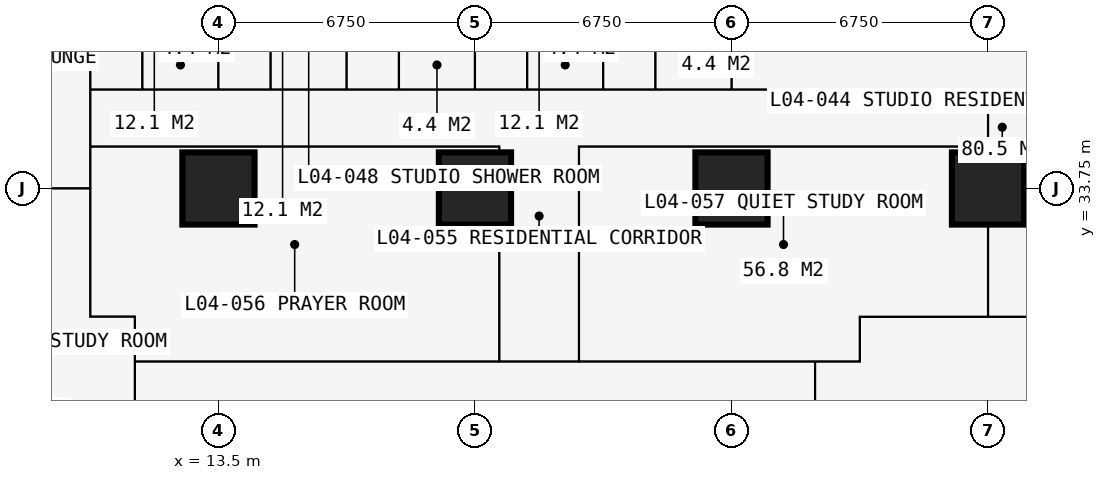
"""IFC4 building model, lengths in metres.
Left out: names, types, materials, properties, quantities, classifications, styles, units other than length and angle.
Written with IfcOpenShell. Run it as: python <this file> out.ifc"""

import sys

from ifc_helpers import new_model, si_unit, direction, frame, frame_2d, origin, origin_2d, place, context, subcontext, project, spatial, rectangle, extrude, element, fill, save


model = new_model("IFC4")
c1 = context("Model", 3, precision=1e-05, world=origin(), true_north=direction((0.0, 1.0)))
c2 = subcontext(c1, "Body", "Model", "MODEL_VIEW")
j1 = project(units=[si_unit("LENGTHUNIT", "METRE"), si_unit("PLANEANGLEUNIT", "RADIAN")], contexts=[c1])
p1 = place(None, origin())
s1 = spatial("IfcSite", under=j1, at=p1, CompositionType="ELEMENT")
p2 = place(p1, origin())
s2 = spatial("IfcBuilding", under=s1, at=p2, CompositionType="ELEMENT")
p3 = place(p2, frame((0.0, 0.0, 18.0)))
s3 = spatial("IfcBuildingStorey", under=s2, at=p3, CompositionType="ELEMENT", Elevation=18.0)
for number, where, z_axis, x_axis in (
    (1, (13.5, 33.75, 0.0), (0.0, 0.0, 1.0), (1.0, 0.0, 0.0)),
    (2, (20.25, 33.75, 0.0), (0.0, 0.0, 1.0), (1.0, 0.0, 0.0)),
    (3, (27.0, 33.75, 0.0), (0.0, 0.0, 1.0), (1.0, 0.0, 0.0)),
    (4, (33.75, 33.75, 0.0), (0.0, 0.0, 1.0), (1.0, 0.0, 0.0)),
):
    element("IfcColumn", number, at=place(p3, frame(where, z_axis=z_axis, x_axis=x_axis)), inside=s3, PredefinedType="COLUMN", context=c2, shape_type="SweptSolid", body=[
        extrude(rectangle(XDim=1.9, YDim=1.9, at=origin_2d()), origin(), (0.0, 0.0, 1.0), 3.6),
    ])
p4 = place(p3, frame((4.15, 33.75, 0.0), z_axis=(0.0, 0.0, 1.0), x_axis=(1.0, 0.0, 0.0)))
e5 = element("IfcWall", 5, at=p4, inside=s3, PredefinedType="PARTITIONING", context=c2, shape_type="SweptSolid", body=[
    extrude(rectangle(XDim=5.975, YDim=0.15, at=frame_2d((2.988, 0.0))), origin(), (0.0, 0.0, 1.0), 2.877),
])
p5 = place(p3, frame((10.125, 30.375, 0.0), z_axis=(0.0, 0.0, 1.0), x_axis=(0.0, 1.0, 0.0)))
e6 = element("IfcWall", 6, at=p5, inside=s3, PredefinedType="PARTITIONING", context=c2, shape_type="SweptSolid", body=[
    extrude(rectangle(XDim=10.859, YDim=0.15, at=frame_2d((5.429, 0.0))), origin(), (0.0, 0.0, 1.0), 3.375),
])
p6 = place(p5, frame((4.725, 0.0, 0.0)))
e7 = element("IfcOpeningElement", 7, at=p6, cuts=e6, PredefinedType="OPENING", context=c2, shape_type="SweptSolid", body=[
    extrude(rectangle(XDim=1.0, YDim=2.2, at=frame_2d((0.5, 1.1))), frame((0.0, 0.085, 0.0), z_axis=(0.0, -1.0, 0.0), x_axis=(1.0, 0.0, 0.0)), (0.0, 0.0, 1.0), 0.17),
])
p7 = place(p3, frame((10.125, 30.375, 0.0), z_axis=(0.0, 0.0, 1.0), x_axis=(1.0, 0.0, 0.0)))
e8 = element("IfcWall", 8, at=p7, inside=s3, PredefinedType="PARTITIONING", context=c2, shape_type="SweptSolid", body=[
    extrude(rectangle(XDim=1.175, YDim=0.15, at=frame_2d((0.587, 0.0))), origin(), (0.0, 0.0, 1.0), 3.375),
])
p8 = place(p3, frame((10.125, 34.85, 0.0), z_axis=(0.0, 0.0, 1.0), x_axis=(1.0, 0.0, 0.0)))
e9 = element("IfcWall", 9, at=p8, inside=s3, PredefinedType="PARTITIONING", context=c2, shape_type="SweptSolid", body=[
    extrude(rectangle(XDim=10.762, YDim=0.15, at=frame_2d((5.381, 0.0))), origin(), (0.0, 0.0, 1.0), 3.375),
])
p9 = place(p8, frame((4.9, 0.0, 0.0)))
e10 = element("IfcOpeningElement", 10, at=p9, cuts=e9, PredefinedType="OPENING", context=c2, shape_type="SweptSolid", body=[
    extrude(rectangle(XDim=0.95, YDim=2.2, at=frame_2d((0.475, 1.1))), frame((0.0, 0.085, 0.0), z_axis=(0.0, -1.0, 0.0), x_axis=(1.0, 0.0, 0.0)), (0.0, 0.0, 1.0), 0.17),
])
p10 = place(p3, frame((10.125, 36.35, 0.0), z_axis=(0.0, 0.0, 1.0), x_axis=(1.0, 0.0, 0.0)))
e11 = element("IfcWall", 11, at=p10, inside=s3, PredefinedType="PARTITIONING", context=c2, shape_type="SweptSolid", body=[
    extrude(rectangle(XDim=23.625, YDim=0.1, at=frame_2d((11.812, 0.0))), origin(), (0.0, 0.0, 1.0), 3.375),
])
p11 = place(p10, frame((0.2, 0.0, 0.0)))
e12 = element("IfcOpeningElement", 12, at=p11, cuts=e11, PredefinedType="OPENING", context=c2, shape_type="SweptSolid", body=[
    extrude(rectangle(XDim=0.95, YDim=2.2, at=frame_2d((0.475, 1.1))), frame((0.0, 0.06, 0.0), z_axis=(0.0, -1.0, 0.0), x_axis=(1.0, 0.0, 0.0)), (0.0, 0.0, 1.0), 0.12),
])
p12 = place(p10, frame((3.625, 0.0, 0.0)))
e13 = element("IfcOpeningElement", 13, at=p12, cuts=e11, PredefinedType="OPENING", context=c2, shape_type="SweptSolid", body=[
    extrude(rectangle(XDim=0.95, YDim=2.2, at=frame_2d((0.475, 1.1))), frame((0.0, 0.06, 0.0), z_axis=(0.0, -1.0, 0.0), x_axis=(1.0, 0.0, 0.0)), (0.0, 0.0, 1.0), 0.12),
])
p13 = place(p10, frame((7.0, 0.0, 0.0)))
e14 = element("IfcOpeningElement", 14, at=p13, cuts=e11, PredefinedType="OPENING", context=c2, shape_type="SweptSolid", body=[
    extrude(rectangle(XDim=0.95, YDim=2.2, at=frame_2d((0.475, 1.1))), frame((0.0, 0.06, 0.0), z_axis=(0.0, -1.0, 0.0), x_axis=(1.0, 0.0, 0.0)), (0.0, 0.0, 1.0), 0.12),
])
p14 = place(p10, frame((10.375, 0.0, 0.0)))
e15 = element("IfcOpeningElement", 15, at=p14, cuts=e11, PredefinedType="OPENING", context=c2, shape_type="SweptSolid", body=[
    extrude(rectangle(XDim=0.95, YDim=2.2, at=frame_2d((0.475, 1.1))), frame((0.0, 0.06, 0.0), z_axis=(0.0, -1.0, 0.0), x_axis=(1.0, 0.0, 0.0)), (0.0, 0.0, 1.0), 0.12),
])
p15 = place(p10, frame((13.75, 0.0, 0.0)))
e16 = element("IfcOpeningElement", 16, at=p15, cuts=e11, PredefinedType="OPENING", context=c2, shape_type="SweptSolid", body=[
    extrude(rectangle(XDim=0.95, YDim=2.2, at=frame_2d((0.475, 1.1))), frame((0.0, 0.06, 0.0), z_axis=(0.0, -1.0, 0.0), x_axis=(1.0, 0.0, 0.0)), (0.0, 0.0, 1.0), 0.12),
])
p16 = place(p3, frame((11.3, 11.3, 0.0), z_axis=(0.0, 0.0, 1.0), x_axis=(0.0, 1.0, 0.0)))
e17 = element("IfcWall", 17, at=p16, inside=s3, PredefinedType="PARTITIONING", context=c2, shape_type="SweptSolid", body=[
    extrude(rectangle(XDim=19.075, YDim=0.15, at=frame_2d((9.538, 0.0))), origin(), (0.0, 0.0, 1.0), 3.375),
])
p17 = place(p16, frame((10.137, 0.0, 0.0)))
e18 = element("IfcOpeningElement", 18, at=p17, cuts=e17, PredefinedType="OPENING", context=c2, shape_type="SweptSolid", body=[
    extrude(rectangle(XDim=1.0, YDim=2.2, at=frame_2d((0.5, 1.1))), frame((0.0, 0.085, 0.0), z_axis=(0.0, -1.0, 0.0), x_axis=(1.0, 0.0, 0.0)), (0.0, 0.0, 1.0), 0.17),
])
p18 = place(p3, frame((11.3, 29.2, 0.0), z_axis=(0.0, 0.0, 1.0), x_axis=(1.0, 0.0, 0.0)))
e19 = element("IfcWall", 19, at=p18, inside=s3, PredefinedType="PARTITIONING", context=c2, shape_type="SweptSolid", body=[
    extrude(rectangle(XDim=19.075, YDim=0.15, at=frame_2d((9.538, 0.0))), origin(), (0.0, 0.0, 1.0), 3.375),
])
p19 = place(p18, frame((10.137, 0.0, 0.0)))
e20 = element("IfcOpeningElement", 20, at=p19, cuts=e19, PredefinedType="OPENING", context=c2, shape_type="SweptSolid", body=[
    extrude(rectangle(XDim=1.0, YDim=2.2, at=frame_2d((0.5, 1.1))), frame((0.0, 0.085, 0.0), z_axis=(0.0, -1.0, 0.0), x_axis=(1.0, 0.0, 0.0)), (0.0, 0.0, 1.0), 0.17),
])
p20 = place(p3, frame((11.5, 36.35, 0.0), z_axis=(0.0, 0.0, 1.0), x_axis=(0.0, 1.0, 0.0)))
e21 = element("IfcWall", 21, at=p20, inside=s3, PredefinedType="PARTITIONING", context=c2, shape_type="SweptSolid", body=[
    extrude(rectangle(XDim=2.2, YDim=0.1, at=frame_2d((1.1, 0.0))), origin(), (0.0, 0.0, 1.0), 3.375),
])
p21 = place(p20, frame((0.65, 0.0, 0.0)))
e22 = element("IfcOpeningElement", 22, at=p21, cuts=e21, PredefinedType="OPENING", context=c2, shape_type="SweptSolid", body=[
    extrude(rectangle(XDim=0.9, YDim=2.2, at=frame_2d((0.45, 1.1))), frame((0.0, 0.06, 0.0), z_axis=(0.0, -1.0, 0.0), x_axis=(1.0, 0.0, 0.0)), (0.0, 0.0, 1.0), 0.12),
])
p22 = place(p3, frame((13.5, 36.35, 0.0), z_axis=(0.0, 0.0, 1.0), x_axis=(0.0, 1.0, 0.0)))
e23 = element("IfcWall", 23, at=p22, inside=s3, PredefinedType="PARTITIONING", context=c2, shape_type="SweptSolid", body=[
    extrude(rectangle(XDim=4.884, YDim=0.175, at=frame_2d((2.442, 0.0))), origin(), (0.0, 0.0, 1.0), 2.877),
])
p23 = place(p3, frame((14.875, 36.35, 0.0), z_axis=(0.0, 0.0, 1.0), x_axis=(0.0, 1.0, 0.0)))
e24 = element("IfcWall", 24, at=p23, inside=s3, PredefinedType="PARTITIONING", context=c2, shape_type="SweptSolid", body=[
    extrude(rectangle(XDim=2.2, YDim=0.1, at=frame_2d((1.1, 0.0))), origin(), (0.0, 0.0, 1.0), 3.375),
])
p24 = place(p23, frame((0.65, 0.0, 0.0)))
e25 = element("IfcOpeningElement", 25, at=p24, cuts=e24, PredefinedType="OPENING", context=c2, shape_type="SweptSolid", body=[
    extrude(rectangle(XDim=0.9, YDim=2.2, at=frame_2d((0.45, 1.1))), frame((0.0, 0.06, 0.0), z_axis=(0.0, -1.0, 0.0), x_axis=(1.0, 0.0, 0.0)), (0.0, 0.0, 1.0), 0.12),
])
p25 = place(p3, frame((16.875, 36.35, 0.0), z_axis=(0.0, 0.0, 1.0), x_axis=(0.0, 1.0, 0.0)))
e26 = element("IfcWall", 26, at=p25, inside=s3, PredefinedType="PARTITIONING", context=c2, shape_type="SweptSolid", body=[
    extrude(rectangle(XDim=4.884, YDim=0.175, at=frame_2d((2.442, 0.0))), origin(), (0.0, 0.0, 1.0), 3.375),
])
p26 = place(p3, frame((18.25, 36.35, 0.0), z_axis=(0.0, 0.0, 1.0), x_axis=(0.0, 1.0, 0.0)))
e27 = element("IfcWall", 27, at=p26, inside=s3, PredefinedType="PARTITIONING", context=c2, shape_type="SweptSolid", body=[
    extrude(rectangle(XDim=2.2, YDim=0.1, at=frame_2d((1.1, 0.0))), origin(), (0.0, 0.0, 1.0), 3.375),
])
p27 = place(p26, frame((0.65, 0.0, 0.0)))
e28 = element("IfcOpeningElement", 28, at=p27, cuts=e27, PredefinedType="OPENING", context=c2, shape_type="SweptSolid", body=[
    extrude(rectangle(XDim=0.9, YDim=2.2, at=frame_2d((0.45, 1.1))), frame((0.0, 0.06, 0.0), z_axis=(0.0, -1.0, 0.0), x_axis=(1.0, 0.0, 0.0)), (0.0, 0.0, 1.0), 0.12),
])
p28 = place(p3, frame((20.25, 36.35, 0.0), z_axis=(0.0, 0.0, 1.0), x_axis=(0.0, 1.0, 0.0)))
e29 = element("IfcWall", 29, at=p28, inside=s3, PredefinedType="PARTITIONING", context=c2, shape_type="SweptSolid", body=[
    extrude(rectangle(XDim=4.884, YDim=0.175, at=frame_2d((2.442, 0.0))), origin(), (0.0, 0.0, 1.0), 2.61),
])
p29 = place(p3, frame((20.887, 29.2, 0.0), z_axis=(0.0, 0.0, 1.0), x_axis=(0.0, 1.0, 0.0)))
e30 = element("IfcWall", 30, at=p29, inside=s3, PredefinedType="PARTITIONING", context=c2, shape_type="SweptSolid", body=[
    extrude(rectangle(XDim=5.65, YDim=0.15, at=frame_2d((2.825, 0.0))), origin(), (0.0, 0.0, 1.0), 3.375),
])
p30 = place(p3, frame((21.625, 36.35, 0.0), z_axis=(0.0, 0.0, 1.0), x_axis=(0.0, 1.0, 0.0)))
e31 = element("IfcWall", 31, at=p30, inside=s3, PredefinedType="PARTITIONING", context=c2, shape_type="SweptSolid", body=[
    extrude(rectangle(XDim=2.2, YDim=0.1, at=frame_2d((1.1, 0.0))), origin(), (0.0, 0.0, 1.0), 3.375),
])
p31 = place(p30, frame((0.65, 0.0, 0.0)))
e32 = element("IfcOpeningElement", 32, at=p31, cuts=e31, PredefinedType="OPENING", context=c2, shape_type="SweptSolid", body=[
    extrude(rectangle(XDim=0.9, YDim=2.2, at=frame_2d((0.45, 1.1))), frame((0.0, 0.06, 0.0), z_axis=(0.0, -1.0, 0.0), x_axis=(1.0, 0.0, 0.0)), (0.0, 0.0, 1.0), 0.12),
])
p32 = place(p3, frame((22.988, 34.85, 0.0), z_axis=(0.0, 0.0, 1.0), x_axis=(1.0, 0.0, 0.0)))
e33 = element("IfcWall", 33, at=p32, inside=s3, PredefinedType="PARTITIONING", context=c2, shape_type="SweptSolid", body=[
    extrude(rectangle(XDim=10.762, YDim=0.15, at=frame_2d((5.381, 0.0))), origin(), (0.0, 0.0, 1.0), 3.375),
])
p33 = place(p32, frame((5.0, 0.0, 0.0)))
e34 = element("IfcOpeningElement", 34, at=p33, cuts=e33, PredefinedType="OPENING", context=c2, shape_type="SweptSolid", body=[
    extrude(rectangle(XDim=0.95, YDim=2.2, at=frame_2d((0.475, 1.1))), frame((0.0, 0.085, 0.0), z_axis=(0.0, -1.0, 0.0), x_axis=(1.0, 0.0, 0.0)), (0.0, 0.0, 1.0), 0.17),
])
p34 = place(p3, frame((22.988, 29.2, 0.0), z_axis=(0.0, 0.0, 1.0), x_axis=(0.0, 1.0, 0.0)))
e35 = element("IfcWall", 35, at=p34, inside=s3, PredefinedType="PARTITIONING", context=c2, shape_type="SweptSolid", body=[
    extrude(rectangle(XDim=5.65, YDim=0.15, at=frame_2d((2.825, 0.0))), origin(), (0.0, 0.0, 1.0), 3.375),
])
p35 = place(p3, frame((23.625, 36.35, 0.0), z_axis=(0.0, 0.0, 1.0), x_axis=(0.0, 1.0, 0.0)))
e36 = element("IfcWall", 36, at=p35, inside=s3, PredefinedType="PARTITIONING", context=c2, shape_type="SweptSolid", body=[
    extrude(rectangle(XDim=4.884, YDim=0.175, at=frame_2d((2.442, 0.0))), origin(), (0.0, 0.0, 1.0), 3.375),
])
p36 = place(p3, frame((25.0, 36.35, 0.0), z_axis=(0.0, 0.0, 1.0), x_axis=(0.0, 1.0, 0.0)))
e37 = element("IfcWall", 37, at=p36, inside=s3, PredefinedType="PARTITIONING", context=c2, shape_type="SweptSolid", body=[
    extrude(rectangle(XDim=2.2, YDim=0.1, at=frame_2d((1.1, 0.0))), origin(), (0.0, 0.0, 1.0), 3.375),
])
p37 = place(p36, frame((0.65, 0.0, 0.0)))
e38 = element("IfcOpeningElement", 38, at=p37, cuts=e37, PredefinedType="OPENING", context=c2, shape_type="SweptSolid", body=[
    extrude(rectangle(XDim=0.9, YDim=2.2, at=frame_2d((0.45, 1.1))), frame((0.0, 0.06, 0.0), z_axis=(0.0, -1.0, 0.0), x_axis=(1.0, 0.0, 0.0)), (0.0, 0.0, 1.0), 0.12),
])
p38 = place(p3, frame((27.0, 36.35, 0.0), z_axis=(0.0, 0.0, 1.0), x_axis=(0.0, 1.0, 0.0)))
e39 = element("IfcWall", 39, at=p38, inside=s3, PredefinedType="PARTITIONING", context=c2, shape_type="SweptSolid", body=[
    extrude(rectangle(XDim=4.884, YDim=0.15, at=frame_2d((2.442, 0.0))), origin(), (0.0, 0.0, 1.0), 2.61),
])
p39 = place(p3, frame((29.2, 11.3, 0.0), z_axis=(0.0, 0.0, 1.0), x_axis=(0.0, 1.0, 0.0)))
e40 = element("IfcWall", 40, at=p39, inside=s3, PredefinedType="PARTITIONING", context=c2, shape_type="SweptSolid", body=[
    extrude(rectangle(XDim=17.9, YDim=0.2, at=frame_2d((8.95, 0.0))), origin(), (0.0, 0.0, 1.0), 3.375),
])
p40 = place(p39, frame((8.35, 0.0, 0.0)))
e41 = element("IfcOpeningElement", 41, at=p40, cuts=e40, PredefinedType="OPENING", context=c2, shape_type="SweptSolid", body=[
    extrude(rectangle(XDim=1.2, YDim=2.2, at=frame_2d((0.6, 1.1))), frame((0.0, 0.11, 0.0), z_axis=(0.0, -1.0, 0.0), x_axis=(1.0, 0.0, 0.0)), (0.0, 0.0, 1.0), 0.22),
])
p41 = place(p3, frame((30.375, 29.2, 0.0), z_axis=(0.0, 0.0, 1.0), x_axis=(0.0, 1.0, 0.0)))
e42 = element("IfcWall", 42, at=p41, inside=s3, PredefinedType="PARTITIONING", context=c2, shape_type="SweptSolid", body=[
    extrude(rectangle(XDim=1.175, YDim=0.15, at=frame_2d((0.587, 0.0))), origin(), (0.0, 0.0, 1.0), 3.375),
])
p42 = place(p3, frame((30.375, 30.375, 0.0), z_axis=(0.0, 0.0, 1.0), x_axis=(1.0, 0.0, 0.0)))
e43 = element("IfcWall", 43, at=p42, inside=s3, PredefinedType="PARTITIONING", context=c2, shape_type="SweptSolid", body=[
    extrude(rectangle(XDim=10.859, YDim=0.15, at=frame_2d((5.429, 0.0))), origin(), (0.0, 0.0, 1.0), 3.375),
])
p43 = place(p42, frame((4.725, 0.0, 0.0)))
e44 = element("IfcOpeningElement", 44, at=p43, cuts=e43, PredefinedType="OPENING", context=c2, shape_type="SweptSolid", body=[
    extrude(rectangle(XDim=1.0, YDim=2.2, at=frame_2d((0.5, 1.1))), frame((0.0, 0.085, 0.0), z_axis=(0.0, -1.0, 0.0), x_axis=(1.0, 0.0, 0.0)), (0.0, 0.0, 1.0), 0.17),
])
p44 = place(p3, frame((33.75, 30.375, 0.0), z_axis=(0.0, 0.0, 1.0), x_axis=(0.0, 1.0, 0.0)))
e45 = element("IfcWall", 45, at=p44, inside=s3, PredefinedType="PARTITIONING", context=c2, shape_type="SweptSolid", body=[
    extrude(rectangle(XDim=5.975, YDim=0.15, at=frame_2d((2.988, 0.0))), origin(), (0.0, 0.0, 1.0), 2.877),
])
p45 = place(p11, origin())
e46 = element("IfcDoor", 46, at=p45, inside=s3, OperationType="SINGLE_SWING_LEFT", PredefinedType="DOOR", context=c2, shape_type="SweptSolid", body=[
    extrude(rectangle(XDim=0.95, YDim=2.2, at=frame_2d((0.475, 1.1))), frame((0.0, 0.025, 0.0), z_axis=(0.0, -1.0, 0.0), x_axis=(1.0, 0.0, 0.0)), (0.0, 0.0, 1.0), 0.05),
])
fill(e12, e46)
p46 = place(p21, origin())
e47 = element("IfcDoor", 47, at=p46, inside=s3, OperationType="SINGLE_SWING_RIGHT", PredefinedType="DOOR", context=c2, shape_type="SweptSolid", body=[
    extrude(rectangle(XDim=0.9, YDim=2.2, at=frame_2d((0.45, 1.1))), frame((0.0, 0.025, 0.0), z_axis=(0.0, -1.0, 0.0), x_axis=(1.0, 0.0, 0.0)), (0.0, 0.0, 1.0), 0.05),
])
fill(e22, e47)
p47 = place(p12, origin())
e48 = element("IfcDoor", 48, at=p47, inside=s3, OperationType="SINGLE_SWING_LEFT", PredefinedType="DOOR", context=c2, shape_type="SweptSolid", body=[
    extrude(rectangle(XDim=0.95, YDim=2.2, at=frame_2d((0.475, 1.1))), frame((0.0, 0.025, 0.0), z_axis=(0.0, -1.0, 0.0), x_axis=(1.0, 0.0, 0.0)), (0.0, 0.0, 1.0), 0.05),
])
fill(e13, e48)
p48 = place(p24, origin())
e49 = element("IfcDoor", 49, at=p48, inside=s3, OperationType="SINGLE_SWING_RIGHT", PredefinedType="DOOR", context=c2, shape_type="SweptSolid", body=[
    extrude(rectangle(XDim=0.9, YDim=2.2, at=frame_2d((0.45, 1.1))), frame((0.0, 0.025, 0.0), z_axis=(0.0, -1.0, 0.0), x_axis=(1.0, 0.0, 0.0)), (0.0, 0.0, 1.0), 0.05),
])
fill(e25, e49)
p49 = place(p13, origin())
e50 = element("IfcDoor", 50, at=p49, inside=s3, OperationType="SINGLE_SWING_LEFT", PredefinedType="DOOR", context=c2, shape_type="SweptSolid", body=[
    extrude(rectangle(XDim=0.95, YDim=2.2, at=frame_2d((0.475, 1.1))), frame((0.0, 0.025, 0.0), z_axis=(0.0, -1.0, 0.0), x_axis=(1.0, 0.0, 0.0)), (0.0, 0.0, 1.0), 0.05),
])
fill(e14, e50)
p50 = place(p27, origin())
e51 = element("IfcDoor", 51, at=p50, inside=s3, OperationType="SINGLE_SWING_RIGHT", PredefinedType="DOOR", context=c2, shape_type="SweptSolid", body=[
    extrude(rectangle(XDim=0.9, YDim=2.2, at=frame_2d((0.45, 1.1))), frame((0.0, 0.025, 0.0), z_axis=(0.0, -1.0, 0.0), x_axis=(1.0, 0.0, 0.0)), (0.0, 0.0, 1.0), 0.05),
])
fill(e28, e51)
p51 = place(p14, origin())
e52 = element("IfcDoor", 52, at=p51, inside=s3, OperationType="SINGLE_SWING_LEFT", PredefinedType="DOOR", context=c2, shape_type="SweptSolid", body=[
    extrude(rectangle(XDim=0.95, YDim=2.2, at=frame_2d((0.475, 1.1))), frame((0.0, 0.025, 0.0), z_axis=(0.0, -1.0, 0.0), x_axis=(1.0, 0.0, 0.0)), (0.0, 0.0, 1.0), 0.05),
])
fill(e15, e52)
p52 = place(p31, origin())
e53 = element("IfcDoor", 53, at=p52, inside=s3, OperationType="SINGLE_SWING_RIGHT", PredefinedType="DOOR", context=c2, shape_type="SweptSolid", body=[
    extrude(rectangle(XDim=0.9, YDim=2.2, at=frame_2d((0.45, 1.1))), frame((0.0, 0.025, 0.0), z_axis=(0.0, -1.0, 0.0), x_axis=(1.0, 0.0, 0.0)), (0.0, 0.0, 1.0), 0.05),
])
fill(e32, e53)
p53 = place(p15, origin())
e54 = element("IfcDoor", 54, at=p53, inside=s3, OperationType="SINGLE_SWING_LEFT", PredefinedType="DOOR", context=c2, shape_type="SweptSolid", body=[
    extrude(rectangle(XDim=0.95, YDim=2.2, at=frame_2d((0.475, 1.1))), frame((0.0, 0.025, 0.0), z_axis=(0.0, -1.0, 0.0), x_axis=(1.0, 0.0, 0.0)), (0.0, 0.0, 1.0), 0.05),
])
fill(e16, e54)
p54 = place(p37, origin())
e55 = element("IfcDoor", 55, at=p54, inside=s3, OperationType="SINGLE_SWING_RIGHT", PredefinedType="DOOR", context=c2, shape_type="SweptSolid", body=[
    extrude(rectangle(XDim=0.9, YDim=2.2, at=frame_2d((0.45, 1.1))), frame((0.0, 0.025, 0.0), z_axis=(0.0, -1.0, 0.0), x_axis=(1.0, 0.0, 0.0)), (0.0, 0.0, 1.0), 0.05),
])
fill(e38, e55)
p55 = place(p19, origin())
e56 = element("IfcDoor", 56, at=p55, inside=s3, OperationType="SINGLE_SWING_LEFT", PredefinedType="DOOR", context=c2, shape_type="SweptSolid", body=[
    extrude(rectangle(XDim=1.0, YDim=2.2, at=frame_2d((0.5, 1.1))), frame((0.0, 0.025, 0.0), z_axis=(0.0, -1.0, 0.0), x_axis=(1.0, 0.0, 0.0)), (0.0, 0.0, 1.0), 0.05),
])
fill(e20, e56)
p56 = place(p9, origin())
e57 = element("IfcDoor", 57, at=p56, inside=s3, OperationType="SINGLE_SWING_LEFT", PredefinedType="DOOR", context=c2, shape_type="SweptSolid", body=[
    extrude(rectangle(XDim=0.95, YDim=2.2, at=frame_2d((0.475, 1.1))), frame((0.0, 0.025, 0.0), z_axis=(0.0, -1.0, 0.0), x_axis=(1.0, 0.0, 0.0)), (0.0, 0.0, 1.0), 0.05),
])
fill(e10, e57)
p57 = place(p33, origin())
e58 = element("IfcDoor", 58, at=p57, inside=s3, OperationType="SINGLE_SWING_LEFT", PredefinedType="DOOR", context=c2, shape_type="SweptSolid", body=[
    extrude(rectangle(XDim=0.95, YDim=2.2, at=frame_2d((0.475, 1.1))), frame((0.0, 0.025, 0.0), z_axis=(0.0, -1.0, 0.0), x_axis=(1.0, 0.0, 0.0)), (0.0, 0.0, 1.0), 0.05),
])
fill(e34, e58)
p58 = place(p6, origin())
e59 = element("IfcDoor", 59, at=p58, inside=s3, OperationType="SINGLE_SWING_LEFT", PredefinedType="DOOR", context=c2, shape_type="SweptSolid", body=[
    extrude(rectangle(XDim=1.0, YDim=2.2, at=frame_2d((0.5, 1.1))), frame((0.0, 0.025, 0.0), z_axis=(0.0, -1.0, 0.0), x_axis=(1.0, 0.0, 0.0)), (0.0, 0.0, 1.0), 0.05),
])
fill(e7, e59)
save(model, sys.argv[1])
